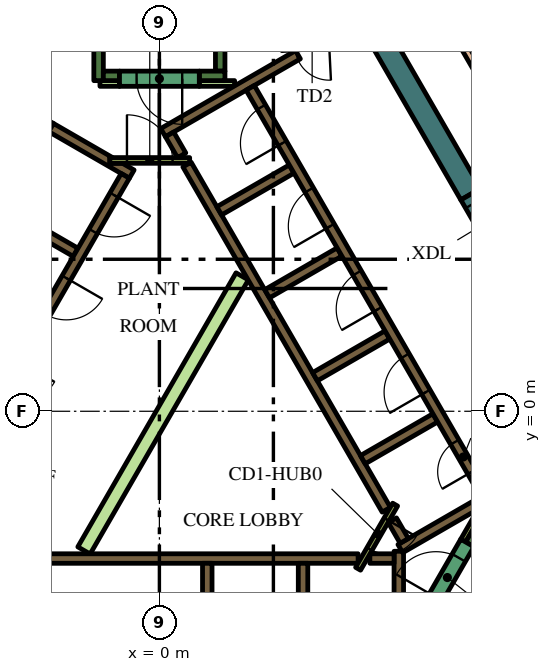
"""IFC4 building model, lengths in metres.
Left out: names, types, materials, properties, quantities, classifications, styles, units other than length and angle.
Written with IfcOpenShell. Run it as: python <this file> out.ifc"""

import sys

from ifc_helpers import new_model, si_unit, direction, frame, frame_2d, origin, place, context, subcontext, project, spatial, polyline, rectangle, outline, extrude, element, fill, save


model = new_model("IFC4")
c1 = context("Model", 3, precision=1e-05, world=origin(), true_north=direction((0.0, 1.0)))
c2 = subcontext(c1, "Body", "Model", "MODEL_VIEW")
j1 = project(units=[si_unit("LENGTHUNIT", "METRE"), si_unit("PLANEANGLEUNIT", "RADIAN")], contexts=[c1])
p1 = place(None, origin())
s1 = spatial("IfcSite", under=j1, at=p1, CompositionType="ELEMENT")
p2 = place(p1, origin())
s2 = spatial("IfcBuilding", under=s1, at=p2, CompositionType="ELEMENT")
p3 = place(p2, frame((0.0, 0.0, 336.0)))
s3 = spatial("IfcBuildingStorey", under=s2, at=p3, CompositionType="ELEMENT", Elevation=336.0)
p4 = place(p3, frame((5.928, 9.633, 0.0), z_axis=(0.0, 0.0, 1.0), x_axis=(0.499983823482, -0.8660347431, 0.0)))
e1 = element("IfcWall", 1, at=p4, inside=s3, PredefinedType="SOLIDWALL", context=c2, shape_type="SweptSolid", body=[
    extrude(rectangle(XDim=4.528, YDim=0.6, at=frame_2d((2.264, 0.0))), origin(), (0.0, 0.0, 1.0), 4.2),
])
p5 = place(p3, frame((8.168, -3.503, 0.0), z_axis=(0.0, 0.0, 1.0), x_axis=(0.49972245349, 0.866185586049, 0.0)))
e2 = element("IfcWall", 2, at=p5, inside=s3, PredefinedType="SOLIDWALL", context=c2, shape_type="SweptSolid", body=[
    extrude(rectangle(XDim=0.425, YDim=0.25, at=frame_2d((0.212, 0.0))), origin(), (0.0, 0.0, 1.0), 4.2),
])
p6 = place(p3, frame((1.6, 8.95, 0.0), z_axis=(0.0, 0.0, 1.0), x_axis=(0.0, 1.0, 0.0)))
e3 = element("IfcWall", 3, at=p6, inside=s3, PredefinedType="SOLIDWALL", context=c2, shape_type="SweptSolid", body=[
    extrude(rectangle(XDim=6.8, YDim=0.25, at=frame_2d((3.4, 0.0))), origin(), (0.0, 0.0, 1.0), 4.2),
])
p7 = place(p3, frame((1.05, 8.825, 0.0), z_axis=(0.0, 0.0, 1.0), x_axis=(1.0, 0.0, 0.0)))
e4 = element("IfcWall", 4, at=p7, inside=s3, PredefinedType="SOLIDWALL", context=c2, shape_type="SweptSolid", body=[
    extrude(rectangle(XDim=0.675, YDim=0.25, at=frame_2d((0.337, 0.0))), origin(), (0.0, 0.0, 1.0), 4.2),
])
p8 = place(p3, frame((-1.6, 8.7, 0.0), z_axis=(0.0, 0.0, 1.0), x_axis=(0.0, 1.0, 0.0)))
e5 = element("IfcWall", 5, at=p8, inside=s3, PredefinedType="SOLIDWALL", context=c2, shape_type="SweptSolid", body=[
    extrude(rectangle(XDim=7.05, YDim=0.25, at=frame_2d((3.525, 0.0))), origin(), (0.0, 0.0, 1.0), 4.2),
])
p9 = place(p3, frame((-1.475, 8.825, 0.0), z_axis=(0.0, 0.0, 1.0), x_axis=(1.0, 0.0, 0.0)))
e6 = element("IfcWall", 6, at=p9, inside=s3, PredefinedType="SOLIDWALL", context=c2, shape_type="SweptSolid", body=[
    extrude(rectangle(XDim=0.425, YDim=0.25, at=frame_2d((0.212, 0.0))), origin(), (0.0, 0.0, 1.0), 4.2),
])
p10 = place(p3, frame((6.3, -7.24, 0.0), z_axis=(0.0, 0.0, 1.0), x_axis=(0.0, 1.0, 0.0)))
e7 = element("IfcWall", 7, at=p10, inside=s3, PredefinedType="SOLIDWALL", context=c2, shape_type="SweptSolid", body=[
    extrude(rectangle(XDim=3.556, YDim=0.25, at=frame_2d((1.778, 0.0))), origin(), (0.0, 0.0, 1.0), 4.2),
])
p11 = place(p3, frame((5.538, -3.875, 0.0), z_axis=(0.0, 0.0, 1.0), x_axis=(1.0, 0.0, 0.0)))
e8 = element("IfcWall", 8, at=p11, inside=s3, PredefinedType="SOLIDWALL", context=c2, shape_type="SweptSolid", body=[
    extrude(rectangle(XDim=0.637, YDim=0.25, at=frame_2d((0.318, 0.0))), origin(), (0.0, 0.0, 1.0), 4.2),
])
p12 = place(p3, frame((-5.259, -3.875, 0.0), z_axis=(0.0, 0.0, 1.0), x_axis=(1.0, 0.0, 0.0)))
e9 = element("IfcWall", 9, at=p12, inside=s3, PredefinedType="SOLIDWALL", context=c2, shape_type="SweptSolid", body=[
    extrude(rectangle(XDim=10.489, YDim=0.25, at=frame_2d((5.244, 0.0))), origin(), (0.0, 0.0, 1.0), 4.2),
])
for number, where, z_axis, x_axis in (
    (10, (1.26, -4.0, 0.0), (0.0, 0.0, 1.0), (0.0, -1.0, 0.0)),
    (11, (3.78, -4.0, 0.0), (0.0, 0.0, 1.0), (0.0, -1.0, 0.0)),
):
    element("IfcWall", number, at=place(p3, frame(where, z_axis=z_axis, x_axis=x_axis)), inside=s3, PredefinedType="SOLIDWALL", context=c2, shape_type="SweptSolid", body=[
        extrude(rectangle(XDim=2.2, YDim=0.25, at=frame_2d((1.1, 0.0))), origin(), (0.0, 0.0, 1.0), 4.2),
    ])
p13 = place(p3, frame((9.19, -1.969, 0.0), z_axis=(0.0, 0.0, 1.0), x_axis=(-0.866057109641, -0.499945079824, 0.0)))
e12 = element("IfcWall", 12, at=p13, inside=s3, PredefinedType="SOLIDWALL", context=c2, shape_type="SweptSolid", body=[
    extrude(rectangle(XDim=3.291, YDim=0.25, at=frame_2d((1.646, 0.0))), origin(), (0.0, 0.0, 1.0), 4.2),
])
p14 = place(p3, frame((6.13, -2.867, 0.0), z_axis=(0.0, 0.0, 1.0), x_axis=(0.500160776593, -0.865932559475, 0.0)))
e13 = element("IfcWall", 13, at=p14, inside=s3, PredefinedType="SOLIDWALL", context=c2, shape_type="SweptSolid", body=[
    extrude(rectangle(XDim=0.627, YDim=0.25, at=frame_2d((0.313, 0.0))), origin(), (0.0, 0.0, 1.0), 4.2),
])
p15 = place(p3, frame((3.647, 9.38, 0.0), z_axis=(0.0, 0.0, 1.0), x_axis=(-0.866027868628, -0.499995730742, 0.0)))
e14 = element("IfcWall", 14, at=p15, inside=s3, PredefinedType="SOLIDWALL", context=c2, shape_type="SweptSolid", body=[
    extrude(rectangle(XDim=4.099, YDim=0.25, at=frame_2d((2.049, 0.0))), origin(), (0.0, 0.0, 1.0), 4.2),
])
p16 = place(p3, frame((0.268, 7.285, 0.0), z_axis=(0.0, 0.0, 1.0), x_axis=(0.500098681536, -0.865968422476, 0.0)))
e15 = element("IfcWall", 15, at=p16, inside=s3, PredefinedType="SOLIDWALL", context=c2, shape_type="SweptSolid", body=[
    extrude(rectangle(XDim=0.636, YDim=0.25, at=frame_2d((0.318, 0.0))), origin(), (0.0, 0.0, 1.0), 4.2),
])
p17 = place(p3, frame((5.97, -2.591, 0.0), z_axis=(0.0, 0.0, 1.0), x_axis=(-0.499994469932, 0.866028596547, 0.0)))
e16 = element("IfcWall", 16, at=p17, inside=s3, PredefinedType="SOLIDWALL", context=c2, shape_type="SweptSolid", body=[
    extrude(rectangle(XDim=10.488, YDim=0.25, at=frame_2d((5.244, 0.0))), origin(), (0.0, 0.0, 1.0), 4.2),
])
p18 = place(p3, frame((1.574, 5.274, 0.0), z_axis=(0.0, 0.0, 1.0), x_axis=(0.866028486751, 0.499994660107, 0.0)))
e17 = element("IfcWall", 17, at=p18, inside=s3, PredefinedType="SOLIDWALL", context=c2, shape_type="SweptSolid", body=[
    extrude(rectangle(XDim=2.2, YDim=0.25, at=frame_2d((1.1, 0.0))), origin(), (0.0, 0.0, 1.0), 4.2),
])
for number, where, z_axis, x_axis in (
    (18, (2.834, 3.091, 0.0), (0.0, 0.0, 1.0), (0.866, 0.5, 0.0)),
    (19, (4.094, 0.909, 0.0), (0.0, 0.0, 1.0), (0.866, 0.5, 0.0)),
    (20, (5.354, -1.274, 0.0), (0.0, 0.0, 1.0), (0.866, 0.5, 0.0)),
):
    element("IfcWall", number, at=place(p3, frame(where, z_axis=z_axis, x_axis=x_axis)), inside=s3, PredefinedType="SOLIDWALL", context=c2, shape_type="SweptSolid", body=[
        extrude(rectangle(XDim=2.2, YDim=0.25, at=frame_2d((1.1, 0.0))), origin(), (0.0, 0.0, 1.0), 4.2),
    ])
p19 = place(p3, frame((-8.06, -1.311, 0.0), z_axis=(0.0, 0.0, 1.0), x_axis=(0.50000273126, 0.866023826885, 0.0)))
e21 = element("IfcWall", 21, at=p19, inside=s3, PredefinedType="SOLIDWALL", context=c2, shape_type="SweptSolid", body=[
    extrude(rectangle(XDim=10.33, YDim=0.25, at=frame_2d((5.165, 0.0))), origin(), (0.0, 0.0, 1.0), 4.2),
])
p20 = place(p3, origin())
e22 = element("IfcWall", 22, at=p20, inside=s3, PredefinedType="SOLIDWALL", context=c2, shape_type="SweptSolid", body=[
    extrude(outline(polyline([(-2.912, 7.356), (-2.787, 7.573), (-1.232, 6.675), (-1.303, 6.675), (-1.304, 6.675), (-1.304, 6.675), (-1.304, 6.525), (-1.304, 6.525), (-1.303, 6.525), (-0.971, 6.525), (-0.665, 6.348), (-0.79, 6.132), (-1.007, 6.257), (-1.007, 6.257), (-2.912, 7.356)])), origin(), (0.0, 0.0, 1.0), 4.2),
])
p21 = place(p3, frame((-2.204, 4.182, 0.0), z_axis=(0.0, 0.0, 1.0), x_axis=(-0.866008176907, 0.50002983664, 0.0)))
e23 = element("IfcWall", 23, at=p21, inside=s3, PredefinedType="SOLIDWALL", context=c2, shape_type="SweptSolid", body=[
    extrude(rectangle(XDim=2.2, YDim=0.25, at=frame_2d((1.1, 0.0))), origin(), (0.0, 0.0, 1.0), 4.2),
])
p22 = place(p3, frame((1.05, 8.625, 0.0), z_axis=(0.0, 0.0, 1.0), x_axis=(1.0, 0.0, 0.0)))
e24 = element("IfcWall", 24, at=p22, inside=s3, PredefinedType="PARTITIONING", context=c2, shape_type="SweptSolid", body=[
    extrude(rectangle(XDim=0.929, YDim=0.15, at=frame_2d((0.464, 0.0))), origin(), (0.0, 0.0, 1.0), 3.45),
])
p23 = place(p3, frame((-1.564, 8.625, 0.0), z_axis=(0.0, 0.0, 1.0), x_axis=(1.0, 0.0, 0.0)))
e25 = element("IfcWall", 25, at=p23, inside=s3, PredefinedType="PARTITIONING", context=c2, shape_type="SweptSolid", body=[
    extrude(rectangle(XDim=0.514, YDim=0.15, at=frame_2d((0.257, 0.0))), origin(), (0.0, 0.0, 1.0), 3.45),
])
p24 = place(p3, frame((8.459, -2.599, 0.0), z_axis=(0.0, 0.0, 1.0), x_axis=(-0.500041054325, -0.866001699761, 0.0)))
e26 = element("IfcWall", 26, at=p24, inside=s3, PredefinedType="PARTITIONING", context=c2, shape_type="SweptSolid", body=[
    extrude(rectangle(XDim=0.929, YDim=0.15, at=frame_2d((0.464, 0.0))), origin(), (0.0, 0.0, 1.0), 4.2),
])
e27 = element("IfcWall", 27, at=p20, inside=s3, PredefinedType="PARTITIONING", context=c2, shape_type="SweptSolid", body=[
    extrude(outline(polyline([(2.017, 3.643), (2.342, 3.456), (-1.822, -3.756), (-2.147, -3.568), (2.017, 3.643)])), origin(), (0.0, 0.0, 1.0), 3.45),
])
p25 = place(p3, frame((8.565, -2.185, 0.0), z_axis=(0.0, 0.0, 1.0), x_axis=(-0.499997954832, 0.866026584559, 0.0)))
e28 = element("IfcWall", 28, at=p25, inside=s3, PredefinedType="SOLIDWALL", context=c2, shape_type="SweptSolid", body=[
    extrude(rectangle(XDim=12.35, YDim=0.25, at=frame_2d((6.175, 0.0))), origin(), (0.0, 0.0, 1.0), 4.2),
])
p26 = place(p25, frame((0.685, 0.0, 0.0)))
e29 = element("IfcOpeningElement", 29, at=p26, cuts=e28, PredefinedType="OPENING", context=c2, shape_type="SweptSolid", body=[
    extrude(rectangle(XDim=0.9, YDim=2.1, at=frame_2d((0.45, 1.05))), frame((0.0, 0.135, 0.0), z_axis=(0.0, -1.0, 0.0), x_axis=(1.0, 0.0, 0.0)), (0.0, 0.0, 1.0), 0.27),
])
p27 = place(p25, frame((3.105, 0.0, 0.0)))
e30 = element("IfcOpeningElement", 30, at=p27, cuts=e28, PredefinedType="OPENING", context=c2, shape_type="SweptSolid", body=[
    extrude(rectangle(XDim=1.1, YDim=2.1, at=frame_2d((0.55, 1.05))), frame((0.0, 0.135, 0.0), z_axis=(0.0, -1.0, 0.0), x_axis=(1.0, 0.0, 0.0)), (0.0, 0.0, 1.0), 0.27),
])
p28 = place(p25, frame((5.625, 0.0, 0.0)))
e31 = element("IfcOpeningElement", 31, at=p28, cuts=e28, PredefinedType="OPENING", context=c2, shape_type="SweptSolid", body=[
    extrude(rectangle(XDim=1.1, YDim=2.1, at=frame_2d((0.55, 1.05))), frame((0.0, 0.135, 0.0), z_axis=(0.0, -1.0, 0.0), x_axis=(1.0, 0.0, 0.0)), (0.0, 0.0, 1.0), 0.27),
])
p29 = place(p25, frame((8.145, 0.0, 0.0)))
e32 = element("IfcOpeningElement", 32, at=p29, cuts=e28, PredefinedType="OPENING", context=c2, shape_type="SweptSolid", body=[
    extrude(rectangle(XDim=1.1, YDim=2.1, at=frame_2d((0.55, 1.05))), frame((0.0, 0.135, 0.0), z_axis=(0.0, -1.0, 0.0), x_axis=(1.0, 0.0, 0.0)), (0.0, 0.0, 1.0), 0.27),
])
p30 = place(p25, frame((10.665, 0.0, 0.0)))
e33 = element("IfcOpeningElement", 33, at=p30, cuts=e28, PredefinedType="OPENING", context=c2, shape_type="SweptSolid", body=[
    extrude(rectangle(XDim=1.1, YDim=2.1, at=frame_2d((0.55, 1.05))), frame((0.0, 0.135, 0.0), z_axis=(0.0, -1.0, 0.0), x_axis=(1.0, 0.0, 0.0)), (0.0, 0.0, 1.0), 0.27),
])
p31 = place(p3, frame((-0.898, 6.194, 0.0), z_axis=(0.0, 0.0, 1.0), x_axis=(-0.499996202215, -0.866027596426, 0.0)))
e34 = element("IfcWall", 34, at=p31, inside=s3, PredefinedType="SOLIDWALL", context=c2, shape_type="SweptSolid", body=[
    extrude(rectangle(XDim=9.83, YDim=0.25, at=frame_2d((4.915, 0.0))), origin(), (0.0, 0.0, 1.0), 4.2),
])
p32 = place(p31, frame((0.585, 0.0, 0.0)))
e35 = element("IfcOpeningElement", 35, at=p32, cuts=e34, PredefinedType="OPENING", context=c2, shape_type="SweptSolid", body=[
    extrude(rectangle(XDim=1.1, YDim=2.1, at=frame_2d((0.55, 1.05))), frame((0.0, 0.135, 0.0), z_axis=(0.0, -1.0, 0.0), x_axis=(1.0, 0.0, 0.0)), (0.0, 0.0, 1.0), 0.27),
])
p33 = place(p31, frame((3.105, 0.0, 0.0)))
e36 = element("IfcOpeningElement", 36, at=p33, cuts=e34, PredefinedType="OPENING", context=c2, shape_type="SweptSolid", body=[
    extrude(rectangle(XDim=1.1, YDim=2.1, at=frame_2d((0.55, 1.05))), frame((0.0, 0.135, 0.0), z_axis=(0.0, -1.0, 0.0), x_axis=(1.0, 0.0, 0.0)), (0.0, 0.0, 1.0), 0.27),
])
p34 = place(p31, frame((5.625, 0.0, 0.0)))
e37 = element("IfcOpeningElement", 37, at=p34, cuts=e34, PredefinedType="OPENING", context=c2, shape_type="SweptSolid", body=[
    extrude(rectangle(XDim=1.1, YDim=2.1, at=frame_2d((0.55, 1.05))), frame((0.0, 0.135, 0.0), z_axis=(0.0, -1.0, 0.0), x_axis=(1.0, 0.0, 0.0)), (0.0, 0.0, 1.0), 0.27),
])
p35 = place(p31, frame((8.145, 0.0, 0.0)))
e38 = element("IfcOpeningElement", 38, at=p35, cuts=e34, PredefinedType="OPENING", context=c2, shape_type="SweptSolid", body=[
    extrude(rectangle(XDim=1.1, YDim=2.1, at=frame_2d((0.55, 1.05))), frame((0.0, 0.135, 0.0), z_axis=(0.0, -1.0, 0.0), x_axis=(1.0, 0.0, 0.0)), (0.0, 0.0, 1.0), 0.27),
])
p36 = place(p3, frame((7.053, -5.284, 0.0), z_axis=(0.0, 0.0, 1.0), x_axis=(0.500078061341, 0.865980330357, 0.0)))
e39 = element("IfcWall", 39, at=p36, inside=s3, PredefinedType="SOLIDWALL", context=c2, shape_type="SweptSolid", body=[
    extrude(rectangle(XDim=2.1, YDim=0.4, at=frame_2d((1.05, 0.0))), origin(), (0.0, 0.0, 1.0), 4.2),
])
p37 = place(p36, frame((0.45, 0.0, 0.0)))
e40 = element("IfcOpeningElement", 40, at=p37, cuts=e39, PredefinedType="OPENING", context=c2, shape_type="SweptSolid", body=[
    extrude(rectangle(XDim=1.2, YDim=2.1, at=frame_2d((0.6, 1.05))), frame((0.0, 0.21, 0.0), z_axis=(0.0, -1.0, 0.0), x_axis=(1.0, 0.0, 0.0)), (0.0, 0.0, 1.0), 0.42),
])
p38 = place(p3, frame((1.05, 8.75, 0.0), z_axis=(0.0, 0.0, 1.0), x_axis=(-1.0, 0.0, 0.0)))
e41 = element("IfcWall", 41, at=p38, inside=s3, PredefinedType="SOLIDWALL", context=c2, shape_type="SweptSolid", body=[
    extrude(rectangle(XDim=2.1, YDim=0.4, at=frame_2d((1.05, 0.0))), origin(), (0.0, 0.0, 1.0), 4.2),
])
p39 = place(p38, frame((0.45, 0.0, 0.0)))
e42 = element("IfcOpeningElement", 42, at=p39, cuts=e41, PredefinedType="OPENING", context=c2, shape_type="SweptSolid", body=[
    extrude(rectangle(XDim=1.2, YDim=2.1, at=frame_2d((0.6, 1.05))), frame((0.0, 0.21, 0.0), z_axis=(0.0, -1.0, 0.0), x_axis=(1.0, 0.0, 0.0)), (0.0, 0.0, 1.0), 0.42),
])
p40 = place(p3, frame((6.203, -2.456, 0.0), z_axis=(0.0, 0.0, 1.0), x_axis=(-0.500043961785, -0.866000020948, 0.0)))
e43 = element("IfcWall", 43, at=p40, inside=s3, PredefinedType="PARTITIONING", context=c2, shape_type="SweptSolid", body=[
    extrude(rectangle(XDim=1.95, YDim=0.15, at=frame_2d((0.975, 0.0))), origin(), (0.0, 0.0, 1.0), 4.2),
])
p41 = place(p40, frame((0.45, 0.0, 0.0)))
e44 = element("IfcOpeningElement", 44, at=p41, cuts=e43, PredefinedType="OPENING", context=c2, shape_type="SweptSolid", body=[
    extrude(rectangle(XDim=0.9, YDim=2.1, at=frame_2d((0.45, 1.05))), frame((0.0, 0.085, 0.0), z_axis=(0.0, -1.0, 0.0), x_axis=(1.0, 0.0, 0.0)), (0.0, 0.0, 1.0), 0.17),
])
p42 = place(p3, frame((-1.303, 6.6, 0.0), z_axis=(0.0, 0.0, 1.0), x_axis=(1.0, 0.0, 0.0)))
e45 = element("IfcWall", 45, at=p42, inside=s3, PredefinedType="PARTITIONING", context=c2, shape_type="SweptSolid", body=[
    extrude(rectangle(XDim=2.1, YDim=0.15, at=frame_2d((1.05, 0.0))), origin(), (0.0, 0.0, 1.0), 4.2),
])
p43 = place(p42, frame((0.45, 0.0, 0.0)))
e46 = element("IfcOpeningElement", 46, at=p43, cuts=e45, PredefinedType="OPENING", context=c2, shape_type="SweptSolid", body=[
    extrude(rectangle(XDim=1.2, YDim=2.1, at=frame_2d((0.6, 1.05))), frame((0.0, 0.085, 0.0), z_axis=(0.0, -1.0, 0.0), x_axis=(1.0, 0.0, 0.0)), (0.0, 0.0, 1.0), 0.17),
])
p44 = place(p3, frame((8.192, 5.711, 0.0), z_axis=(0.0, 0.0, 1.0), x_axis=(0.500062241894, -0.865989465428, 0.0)))
e47 = element("IfcWall", 47, at=p44, inside=s3, PredefinedType="SOLIDWALL", context=c2, shape_type="SweptSolid", body=[
    extrude(rectangle(XDim=1.7, YDim=0.6, at=frame_2d((0.85, 0.0))), origin(), (0.0, 0.0, 1.0), 4.2),
])
p45 = place(p44, frame((0.25, 0.0, 0.0)))
e48 = element("IfcOpeningElement", 48, at=p45, cuts=e47, PredefinedType="OPENING", context=c2, shape_type="SweptSolid", body=[
    extrude(rectangle(XDim=1.2, YDim=2.1, at=frame_2d((0.6, 1.05))), frame((0.0, 0.31, 0.0), z_axis=(0.0, -1.0, 0.0), x_axis=(1.0, 0.0, 0.0)), (0.0, 0.0, 1.0), 0.62),
])
p46 = place(p3, frame((10.171, 5.884, 0.0), z_axis=(0.0, 0.0, 1.0), x_axis=(-0.499999609035, 0.866025629508, 0.0)))
e49 = element("IfcWall", 49, at=p46, inside=s3, PredefinedType="PARTITIONING", context=c2, shape_type="SweptSolid", body=[
    extrude(rectangle(XDim=14.106, YDim=0.2, at=frame_2d((7.053, 0.0))), origin(), (0.0, 0.0, 1.0), 3.45),
])
p47 = place(p46, frame((6.453, 0.0, 0.0)))
e50 = element("IfcOpeningElement", 50, at=p47, cuts=e49, PredefinedType="OPENING", context=c2, shape_type="SweptSolid", body=[
    extrude(rectangle(XDim=1.2, YDim=2.1, at=frame_2d((0.6, 1.05))), frame((0.0, 0.11, 0.0), z_axis=(0.0, -1.0, 0.0), x_axis=(1.0, 0.0, 0.0)), (0.0, 0.0, 1.0), 0.22),
])
p48 = place(p3, frame((18.181, -1.79, 0.0), z_axis=(0.0, 0.0, 1.0), x_axis=(-0.500002158106, 0.866024157798, 0.0)))
e51 = element("IfcWall", 51, at=p48, inside=s3, PredefinedType="SOLIDWALL", context=c2, shape_type="SweptSolid", body=[
    extrude(rectangle(XDim=21.282, YDim=0.3, at=frame_2d((10.641, 0.0))), origin(), (0.0, 0.0, 1.0), 3.45),
])
p49 = place(p26, origin())
e52 = element("IfcDoor", 52, at=p49, inside=s3, OperationType="SINGLE_SWING_LEFT", PredefinedType="DOOR", context=c2, shape_type="SweptSolid", body=[
    extrude(rectangle(XDim=0.9, YDim=2.1, at=frame_2d((0.45, 1.05))), frame((0.0, 0.025, 0.0), z_axis=(0.0, -1.0, 0.0), x_axis=(1.0, 0.0, 0.0)), (0.0, 0.0, 1.0), 0.05),
])
fill(e29, e52)
p50 = place(p27, origin())
e53 = element("IfcDoor", 53, at=p50, inside=s3, OperationType="DOUBLE_DOOR_SLIDING", PredefinedType="DOOR", context=c2, shape_type="SweptSolid", body=[
    extrude(rectangle(XDim=1.1, YDim=2.1, at=frame_2d((0.55, 1.05))), frame((0.0, 0.025, 0.0), z_axis=(0.0, -1.0, 0.0), x_axis=(1.0, 0.0, 0.0)), (0.0, 0.0, 1.0), 0.05),
])
fill(e30, e53)
p51 = place(p28, origin())
e54 = element("IfcDoor", 54, at=p51, inside=s3, OperationType="DOUBLE_DOOR_SLIDING", PredefinedType="DOOR", context=c2, shape_type="SweptSolid", body=[
    extrude(rectangle(XDim=1.1, YDim=2.1, at=frame_2d((0.55, 1.05))), frame((0.0, 0.025, 0.0), z_axis=(0.0, -1.0, 0.0), x_axis=(1.0, 0.0, 0.0)), (0.0, 0.0, 1.0), 0.05),
])
fill(e31, e54)
p52 = place(p29, origin())
e55 = element("IfcDoor", 55, at=p52, inside=s3, OperationType="DOUBLE_DOOR_SLIDING", PredefinedType="DOOR", context=c2, shape_type="SweptSolid", body=[
    extrude(rectangle(XDim=1.1, YDim=2.1, at=frame_2d((0.55, 1.05))), frame((0.0, 0.025, 0.0), z_axis=(0.0, -1.0, 0.0), x_axis=(1.0, 0.0, 0.0)), (0.0, 0.0, 1.0), 0.05),
])
fill(e32, e55)
p53 = place(p30, origin())
e56 = element("IfcDoor", 56, at=p53, inside=s3, OperationType="DOUBLE_DOOR_SLIDING", PredefinedType="DOOR", context=c2, shape_type="SweptSolid", body=[
    extrude(rectangle(XDim=1.1, YDim=2.1, at=frame_2d((0.55, 1.05))), frame((0.0, 0.025, 0.0), z_axis=(0.0, -1.0, 0.0), x_axis=(1.0, 0.0, 0.0)), (0.0, 0.0, 1.0), 0.05),
])
fill(e33, e56)
p54 = place(p32, origin())
e57 = element("IfcDoor", 57, at=p54, inside=s3, OperationType="DOUBLE_DOOR_SLIDING", PredefinedType="DOOR", context=c2, shape_type="SweptSolid", body=[
    extrude(rectangle(XDim=1.1, YDim=2.1, at=frame_2d((0.55, 1.05))), frame((0.0, 0.025, 0.0), z_axis=(0.0, -1.0, 0.0), x_axis=(1.0, 0.0, 0.0)), (0.0, 0.0, 1.0), 0.05),
])
fill(e35, e57)
p55 = place(p33, origin())
e58 = element("IfcDoor", 58, at=p55, inside=s3, OperationType="DOUBLE_DOOR_SLIDING", PredefinedType="DOOR", context=c2, shape_type="SweptSolid", body=[
    extrude(rectangle(XDim=1.1, YDim=2.1, at=frame_2d((0.55, 1.05))), frame((0.0, 0.025, 0.0), z_axis=(0.0, -1.0, 0.0), x_axis=(1.0, 0.0, 0.0)), (0.0, 0.0, 1.0), 0.05),
])
fill(e36, e58)
p56 = place(p37, origin())
e59 = element("IfcDoor", 59, at=p56, inside=s3, OperationType="SINGLE_SWING_LEFT", PredefinedType="DOOR", context=c2, shape_type="SweptSolid", body=[
    extrude(rectangle(XDim=1.2, YDim=2.1, at=frame_2d((0.6, 1.05))), frame((0.0, 0.025, 0.0), z_axis=(0.0, -1.0, 0.0), x_axis=(1.0, 0.0, 0.0)), (0.0, 0.0, 1.0), 0.05),
])
fill(e40, e59)
p57 = place(p39, origin())
e60 = element("IfcDoor", 60, at=p57, inside=s3, OperationType="SINGLE_SWING_LEFT", PredefinedType="DOOR", context=c2, shape_type="SweptSolid", body=[
    extrude(rectangle(XDim=1.2, YDim=2.1, at=frame_2d((0.6, 1.05))), frame((0.0, 0.025, 0.0), z_axis=(0.0, -1.0, 0.0), x_axis=(1.0, 0.0, 0.0)), (0.0, 0.0, 1.0), 0.05),
])
fill(e42, e60)
p58 = place(p41, origin())
e61 = element("IfcDoor", 61, at=p58, inside=s3, OperationType="SINGLE_SWING_LEFT", PredefinedType="DOOR", context=c2, shape_type="SweptSolid", body=[
    extrude(rectangle(XDim=0.9, YDim=2.1, at=frame_2d((0.45, 1.05))), frame((0.0, 0.025, 0.0), z_axis=(0.0, -1.0, 0.0), x_axis=(1.0, 0.0, 0.0)), (0.0, 0.0, 1.0), 0.05),
])
fill(e44, e61)
p59 = place(p43, origin())
e62 = element("IfcDoor", 62, at=p59, inside=s3, OperationType="SINGLE_SWING_LEFT", PredefinedType="DOOR", context=c2, shape_type="SweptSolid", body=[
    extrude(rectangle(XDim=1.2, YDim=2.1, at=frame_2d((0.6, 1.05))), frame((0.0, 0.025, 0.0), z_axis=(0.0, -1.0, 0.0), x_axis=(1.0, 0.0, 0.0)), (0.0, 0.0, 1.0), 0.05),
])
fill(e46, e62)
save(model, sys.argv[1])
